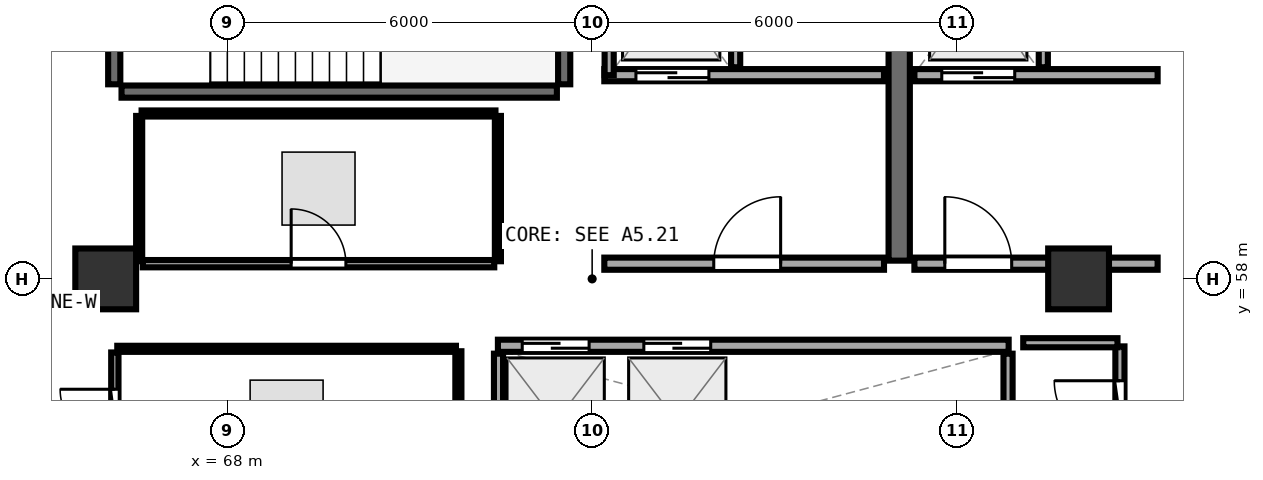
"""IFC4 building model, lengths in metres.
Left out: names, types, materials, properties, quantities, classifications, styles, units other than length and angle.
Written with IfcOpenShell. Run it as: python <this file> out.ifc"""

import sys

from ifc_helpers import new_model, si_unit, direction, frame, frame_2d, origin, origin_2d, place, context, subcontext, project, spatial, rectangle, extrude, element, fill, save


model = new_model("IFC4")
c1 = context("Model", 3, precision=1e-05, world=origin(), true_north=direction((0.0, 1.0)))
c2 = subcontext(c1, "Body", "Model", "MODEL_VIEW")
j1 = project(units=[si_unit("LENGTHUNIT", "METRE"), si_unit("PLANEANGLEUNIT", "RADIAN")], contexts=[c1])
p1 = place(None, origin())
s1 = spatial("IfcSite", under=j1, at=p1, CompositionType="ELEMENT")
p2 = place(p1, origin())
s2 = spatial("IfcBuilding", under=s1, at=p2, CompositionType="ELEMENT")
p3 = place(p2, frame((0.0, 0.0, 274.95)))
s3 = spatial("IfcBuildingStorey", under=s2, at=p3, CompositionType="ELEMENT", Elevation=274.95)
for number, where, z_axis, x_axis in (
    (1, (82.0, 58.0, 0.0), (0.0, 0.0, 1.0), (1.0, 0.0, 0.0)),
    (2, (66.0, 58.0, 0.0), (0.0, 0.0, 1.0), (1.0, 0.0, 0.0)),
):
    element("IfcColumn", number, at=place(p3, frame(where, z_axis=z_axis, x_axis=x_axis)), inside=s3, PredefinedType="PILASTER", context=c2, shape_type="SweptSolid", body=[
        extrude(rectangle(XDim=1.0, YDim=1.0, at=origin_2d()), origin(), (0.0, 0.0, 1.0), 3.75),
    ])
p4 = place(p3, frame((66.26, 61.08, 0.0), z_axis=(0.0, 0.0, 1.0), x_axis=(1.0, 0.0, 0.0)))
e3 = element("IfcWall", 3, at=p4, inside=s3, PredefinedType="SHEAR", context=c2, shape_type="SweptSolid", body=[
    extrude(rectangle(XDim=7.16, YDim=0.2, at=frame_2d((3.58, 0.0))), origin(), (0.0, 0.0, 1.0), 3.49),
])
p5 = place(p3, frame((73.54, 61.2, 0.0), z_axis=(0.0, 0.0, 1.0), x_axis=(0.0, 1.0, 0.0)))
e4 = element("IfcWall", 4, at=p5, inside=s3, PredefinedType="SHEAR", context=c2, shape_type="SweptSolid", body=[
    extrude(rectangle(XDim=3.07, YDim=0.2, at=frame_2d((1.535, 0.0))), origin(), (0.0, 0.0, 1.0), 3.49),
])
p6 = place(p3, frame((66.14, 64.27, 0.0), z_axis=(0.0, 0.0, 1.0), x_axis=(0.0, -1.0, 0.0)))
e5 = element("IfcWall", 5, at=p6, inside=s3, PredefinedType="SHEAR", context=c2, shape_type="SweptSolid", body=[
    extrude(rectangle(XDim=3.07, YDim=0.2, at=frame_2d((1.535, 0.0))), origin(), (0.0, 0.0, 1.0), 3.49),
])
p7 = place(p6, frame((1.01, 0.0, 0.0)))
e6 = element("IfcOpeningElement", 6, at=p7, cuts=e5, PredefinedType="OPENING", context=c2, shape_type="SweptSolid", body=[
    extrude(rectangle(XDim=1.05, YDim=2.1, at=frame_2d((0.525, 1.05))), frame((0.0, 0.11, 0.0), z_axis=(0.0, -1.0, 0.0), x_axis=(1.0, 0.0, 0.0)), (0.0, 0.0, 1.0), 0.22),
])
p8 = place(p3, frame((79.05, 58.3, 0.0), z_axis=(0.0, 0.0, 1.0), x_axis=(0.0, 1.0, 0.0)))
e7 = element("IfcWall", 7, at=p8, inside=s3, PredefinedType="SHEAR", context=c2, shape_type="SweptSolid", body=[
    extrude(rectangle(XDim=6.3, YDim=0.35, at=frame_2d((3.15, 0.0))), origin(), (0.0, 0.0, 1.0), 3.49),
])
p9 = place(p3, frame((74.2, 61.35, 0.0), z_axis=(0.0, 0.0, 1.0), x_axis=(1.0, 0.0, 0.0)))
e8 = element("IfcWall", 8, at=p9, inside=s3, PredefinedType="SOLIDWALL", context=c2, shape_type="SweptSolid", body=[
    extrude(rectangle(XDim=4.6, YDim=0.2, at=frame_2d((2.3, 0.0))), origin(), (0.0, 0.0, 1.0), 3.48),
])
p10 = place(p9, frame((0.52, 0.0, 0.0)))
e9 = element("IfcOpeningElement", 9, at=p10, cuts=e8, PredefinedType="OPENING", context=c2, shape_type="SweptSolid", body=[
    extrude(rectangle(XDim=1.2, YDim=2.15, at=frame_2d((0.6, 1.075))), frame((0.0, 0.11, 0.0), z_axis=(0.0, -1.0, 0.0), x_axis=(1.0, 0.0, 0.0)), (0.0, 0.0, 1.0), 0.22),
])
p11 = place(p3, frame((74.28, 61.35, 0.0), z_axis=(0.0, 0.0, 1.0), x_axis=(0.0, 1.0, 0.0)))
e10 = element("IfcWall", 10, at=p11, inside=s3, PredefinedType="PARTITIONING", context=c2, shape_type="SweptSolid", body=[
    extrude(rectangle(XDim=2.97, YDim=0.15, at=frame_2d((1.485, 0.0))), origin(), (0.0, 0.0, 1.0), 3.48),
])
p12 = place(p3, frame((76.36, 61.48, 0.0), z_axis=(0.0, 0.0, 1.0), x_axis=(0.0, 1.0, 0.0)))
e11 = element("IfcWall", 11, at=p12, inside=s3, PredefinedType="PARTITIONING", context=c2, shape_type="SweptSolid", body=[
    extrude(rectangle(XDim=2.84, YDim=0.15, at=frame_2d((1.42, 0.0))), origin(), (0.0, 0.0, 1.0), 3.48),
])
p13 = place(p3, frame((79.3, 61.35, 0.0), z_axis=(0.0, 0.0, 1.0), x_axis=(1.0, 0.0, 0.0)))
e12 = element("IfcWall", 12, at=p13, inside=s3, PredefinedType="SOLIDWALL", context=c2, shape_type="SweptSolid", body=[
    extrude(rectangle(XDim=4.0, YDim=0.2, at=frame_2d((2.0, 0.0))), origin(), (0.0, 0.0, 1.0), 2.775),
])
p14 = place(p13, frame((0.45, 0.0, 0.0)))
e13 = element("IfcOpeningElement", 13, at=p14, cuts=e12, PredefinedType="OPENING", context=c2, shape_type="SweptSolid", body=[
    extrude(rectangle(XDim=1.2, YDim=2.15, at=frame_2d((0.6, 1.075))), frame((0.0, 0.11, 0.0), z_axis=(0.0, -1.0, 0.0), x_axis=(1.0, 0.0, 0.0)), (0.0, 0.0, 1.0), 0.22),
])
p15 = place(p3, frame((81.42, 61.48, 0.0), z_axis=(0.0, 0.0, 1.0), x_axis=(0.0, 1.0, 0.0)))
e14 = element("IfcWall", 14, at=p15, inside=s3, PredefinedType="PARTITIONING", context=c2, shape_type="SweptSolid", body=[
    extrude(rectangle(XDim=2.84, YDim=0.15, at=frame_2d((1.42, 0.0))), origin(), (0.0, 0.0, 1.0), 3.48),
])
p16 = place(p3, frame((74.2, 58.25, 0.0), z_axis=(0.0, 0.0, 1.0), x_axis=(1.0, 0.0, 0.0)))
e15 = element("IfcWall", 15, at=p16, inside=s3, PredefinedType="SOLIDWALL", context=c2, shape_type="SweptSolid", body=[
    extrude(rectangle(XDim=4.6, YDim=0.2, at=frame_2d((2.3, 0.0))), origin(), (0.0, 0.0, 1.0), 3.48),
])
p17 = place(p16, frame((1.8, 0.0, 0.0)))
e16 = element("IfcOpeningElement", 16, at=p17, cuts=e15, PredefinedType="OPENING", context=c2, shape_type="SweptSolid", body=[
    extrude(rectangle(XDim=1.1, YDim=2.1, at=frame_2d((0.55, 1.05))), frame((0.0, 0.11, 0.0), z_axis=(0.0, -1.0, 0.0), x_axis=(1.0, 0.0, 0.0)), (0.0, 0.0, 1.0), 0.22),
])
p18 = place(p3, frame((79.3, 58.25, 0.0), z_axis=(0.0, 0.0, 1.0), x_axis=(1.0, 0.0, 0.0)))
e17 = element("IfcWall", 17, at=p18, inside=s3, PredefinedType="SOLIDWALL", context=c2, shape_type="SweptSolid", body=[
    extrude(rectangle(XDim=4.0, YDim=0.2, at=frame_2d((2.0, 0.0))), origin(), (0.0, 0.0, 1.0), 2.775),
])
p19 = place(p18, frame((0.5, 0.0, 0.0)))
e18 = element("IfcOpeningElement", 18, at=p19, cuts=e17, PredefinedType="OPENING", context=c2, shape_type="SweptSolid", body=[
    extrude(rectangle(XDim=1.1, YDim=2.1, at=frame_2d((0.55, 1.05))), frame((0.0, 0.11, 0.0), z_axis=(0.0, -1.0, 0.0), x_axis=(1.0, 0.0, 0.0)), (0.0, 0.0, 1.0), 0.22),
])
p20 = place(p3, frame((72.45, 56.9, 0.0), z_axis=(0.0, 0.0, 1.0), x_axis=(1.0, 0.0, 0.0)))
e19 = element("IfcWall", 19, at=p20, inside=s3, PredefinedType="SOLIDWALL", context=c2, shape_type="SweptSolid", body=[
    extrude(rectangle(XDim=8.4, YDim=0.2, at=frame_2d((4.2, 0.0))), origin(), (0.0, 0.0, 1.0), 3.48),
])
p21 = place(p20, frame((0.4, 0.0, 0.0)))
e20 = element("IfcOpeningElement", 20, at=p21, cuts=e19, PredefinedType="OPENING", context=c2, shape_type="SweptSolid", body=[
    extrude(rectangle(XDim=1.1, YDim=2.1, at=frame_2d((0.55, 1.05))), frame((0.0, 0.11, 0.0), z_axis=(0.0, -1.0, 0.0), x_axis=(1.0, 0.0, 0.0)), (0.0, 0.0, 1.0), 0.22),
])
p22 = place(p20, frame((2.4, 0.0, 0.0)))
e21 = element("IfcOpeningElement", 21, at=p22, cuts=e19, PredefinedType="OPENING", context=c2, shape_type="SweptSolid", body=[
    extrude(rectangle(XDim=1.1, YDim=2.1, at=frame_2d((0.55, 1.05))), frame((0.0, 0.11, 0.0), z_axis=(0.0, -1.0, 0.0), x_axis=(1.0, 0.0, 0.0)), (0.0, 0.0, 1.0), 0.22),
])
for number, where, z_axis, x_axis in (
    (22, (72.46, 54.48, 0.0), (0.0, 0.0, 1.0), (0.0, 1.0, 0.0)),
    (23, (80.84, 54.48, 0.0), (0.0, 0.0, 1.0), (0.0, 1.0, 0.0)),
):
    element("IfcWall", number, at=place(p3, frame(where, z_axis=z_axis, x_axis=x_axis)), inside=s3, PredefinedType="PARTITIONING", context=c2, shape_type="SweptSolid", body=[
        extrude(rectangle(XDim=2.29, YDim=0.15, at=frame_2d((1.145, 0.0))), origin(), (0.0, 0.0, 1.0), 3.48),
    ])
p23 = place(p3, frame((82.68, 54.68, 0.0), z_axis=(0.0, 0.0, 1.0), x_axis=(0.0, 1.0, 0.0)))
e24 = element("IfcWall", 24, at=p23, inside=s3, PredefinedType="PARTITIONING", context=c2, shape_type="SweptSolid", body=[
    extrude(rectangle(XDim=2.21, YDim=0.15, at=frame_2d((1.105, 0.0))), origin(), (0.0, 0.0, 1.0), 3.48),
])
p24 = place(p23, frame((0.565, 0.0, 0.0)))
e25 = element("IfcOpeningElement", 25, at=p24, cuts=e24, PredefinedType="OPENING", context=c2, shape_type="SweptSolid", body=[
    extrude(rectangle(XDim=1.08, YDim=2.1, at=frame_2d((0.54, 1.05))), frame((0.0, 0.085, 0.0), z_axis=(0.0, -1.0, 0.0), x_axis=(1.0, 0.0, 0.0)), (0.0, 0.0, 1.0), 0.17),
])
p25 = place(p3, frame((66.61, 58.25, 0.0), z_axis=(0.0, 0.0, 1.0), x_axis=(1.0, 0.0, 0.0)))
e26 = element("IfcWall", 26, at=p25, inside=s3, PredefinedType="PARTITIONING", context=c2, shape_type="SweptSolid", body=[
    extrude(rectangle(XDim=5.78, YDim=0.12, at=frame_2d((2.89, 0.0))), origin(), (0.0, 0.0, 1.0), 3.48),
])
p26 = place(p25, frame((2.44, 0.0, 0.0)))
e27 = element("IfcOpeningElement", 27, at=p26, cuts=e26, PredefinedType="OPENING", context=c2, shape_type="SweptSolid", body=[
    extrude(rectangle(XDim=0.9, YDim=2.08, at=frame_2d((0.45, 1.04))), frame((0.0, 0.07, 0.0), z_axis=(0.0, -1.0, 0.0), x_axis=(1.0, 0.0, 0.0)), (0.0, 0.0, 1.0), 0.14),
])
p27 = place(p3, frame((66.15, 54.68, 0.0), z_axis=(0.0, 0.0, 1.0), x_axis=(0.0, 1.0, 0.0)))
e28 = element("IfcWall", 28, at=p27, inside=s3, PredefinedType="PARTITIONING", context=c2, shape_type="SweptSolid", body=[
    extrude(rectangle(XDim=2.11, YDim=0.12, at=frame_2d((1.055, 0.0))), origin(), (0.0, 0.0, 1.0), 2.775),
])
p28 = place(p27, frame((0.605, 0.0, 0.0)))
e29 = element("IfcOpeningElement", 29, at=p28, cuts=e28, PredefinedType="OPENING", context=c2, shape_type="SweptSolid", body=[
    extrude(rectangle(XDim=0.9, YDim=2.08, at=frame_2d((0.45, 1.04))), frame((0.0, 0.07, 0.0), z_axis=(0.0, -1.0, 0.0), x_axis=(1.0, 0.0, 0.0)), (0.0, 0.0, 1.0), 0.14),
])
p29 = place(p3, frame((82.64, 56.95, 0.0), z_axis=(0.0, 0.0, 1.0), x_axis=(-1.0, 0.0, 0.0)))
e30 = element("IfcWall", 30, at=p29, inside=s3, PredefinedType="PARTITIONING", context=c2, shape_type="SweptSolid", body=[
    extrude(rectangle(XDim=1.55, YDim=0.15, at=frame_2d((0.775, 0.0))), origin(), (0.0, 0.0, 1.0), 2.775),
])
p30 = place(p3, frame((72.45, 58.29, 0.0), z_axis=(0.0, 0.0, 1.0), x_axis=(0.0, 1.0, 0.0)))
e31 = element("IfcWall", 31, at=p30, inside=s3, PredefinedType="PARTITIONING", context=c2, shape_type="SweptSolid", body=[
    extrude(rectangle(XDim=2.39, YDim=0.1, at=frame_2d((1.195, 0.0))), origin(), (0.0, 0.0, 1.0), 3.48),
])
p31 = place(p3, frame((72.41, 60.72, 0.0), z_axis=(0.0, 0.0, 1.0), x_axis=(-1.0, 0.0, 0.0)))
e32 = element("IfcWall", 32, at=p31, inside=s3, PredefinedType="PARTITIONING", context=c2, shape_type="SweptSolid", body=[
    extrude(rectangle(XDim=5.82, YDim=0.1, at=frame_2d((2.91, 0.0))), origin(), (0.0, 0.0, 1.0), 3.48),
])
p32 = place(p3, frame((66.55, 60.68, 0.0), z_axis=(0.0, 0.0, 1.0), x_axis=(0.0, -1.0, 0.0)))
e33 = element("IfcWall", 33, at=p32, inside=s3, PredefinedType="PARTITIONING", context=c2, shape_type="SweptSolid", body=[
    extrude(rectangle(XDim=2.39, YDim=0.1, at=frame_2d((1.195, 0.0))), origin(), (0.0, 0.0, 1.0), 3.48),
])
p33 = place(p3, frame((71.8, 54.66, 0.0), z_axis=(0.0, 0.0, 1.0), x_axis=(0.0, 1.0, 0.0)))
e34 = element("IfcWall", 34, at=p33, inside=s3, PredefinedType="PARTITIONING", context=c2, shape_type="SweptSolid", body=[
    extrude(rectangle(XDim=2.15, YDim=0.1, at=frame_2d((1.075, 0.0))), origin(), (0.0, 0.0, 1.0), 3.48),
])
p34 = place(p3, frame((71.76, 56.85, 0.0), z_axis=(0.0, 0.0, 1.0), x_axis=(-1.0, 0.0, 0.0)))
e35 = element("IfcWall", 35, at=p34, inside=s3, PredefinedType="PARTITIONING", context=c2, shape_type="SweptSolid", body=[
    extrude(rectangle(XDim=5.57, YDim=0.1, at=frame_2d((2.785, 0.0))), origin(), (0.0, 0.0, 1.0), 2.775),
])
p35 = place(p10, origin())
e36 = element("IfcDoor", 36, at=p35, inside=s3, OperationType="DOUBLE_DOOR_SLIDING", PredefinedType="DOOR", context=c2, shape_type="SweptSolid", body=[
    extrude(rectangle(XDim=1.2, YDim=2.15, at=frame_2d((0.6, 1.075))), frame((0.0, 0.025, 0.0), z_axis=(0.0, -1.0, 0.0), x_axis=(1.0, 0.0, 0.0)), (0.0, 0.0, 1.0), 0.05),
])
fill(e9, e36)
p36 = place(p14, origin())
e37 = element("IfcDoor", 37, at=p36, inside=s3, OperationType="DOUBLE_DOOR_SLIDING", PredefinedType="DOOR", context=c2, shape_type="SweptSolid", body=[
    extrude(rectangle(XDim=1.2, YDim=2.15, at=frame_2d((0.6, 1.075))), frame((0.0, 0.025, 0.0), z_axis=(0.0, -1.0, 0.0), x_axis=(1.0, 0.0, 0.0)), (0.0, 0.0, 1.0), 0.05),
])
fill(e13, e37)
p37 = place(p17, frame((1.1, 0.0, 0.0), z_axis=(0.0, 0.0, 1.0), x_axis=(-1.0, 0.0, 0.0)))
e38 = element("IfcDoor", 38, at=p37, inside=s3, OperationType="SINGLE_SWING_LEFT", PredefinedType="DOOR", context=c2, shape_type="SweptSolid", body=[
    extrude(rectangle(XDim=1.1, YDim=2.1, at=frame_2d((0.55, 1.05))), frame((0.0, 0.025, 0.0), z_axis=(0.0, -1.0, 0.0), x_axis=(1.0, 0.0, 0.0)), (0.0, 0.0, 1.0), 0.05),
])
fill(e16, e38)
p38 = place(p19, frame((1.1, 0.0, 0.0), z_axis=(0.0, 0.0, 1.0), x_axis=(-1.0, 0.0, 0.0)))
e39 = element("IfcDoor", 39, at=p38, inside=s3, OperationType="SINGLE_SWING_RIGHT", PredefinedType="DOOR", context=c2, shape_type="SweptSolid", body=[
    extrude(rectangle(XDim=1.1, YDim=2.1, at=frame_2d((0.55, 1.05))), frame((0.0, 0.025, 0.0), z_axis=(0.0, -1.0, 0.0), x_axis=(1.0, 0.0, 0.0)), (0.0, 0.0, 1.0), 0.05),
])
fill(e18, e39)
p39 = place(p21, origin())
e40 = element("IfcDoor", 40, at=p39, inside=s3, OperationType="DOUBLE_DOOR_SLIDING", PredefinedType="DOOR", context=c2, shape_type="SweptSolid", body=[
    extrude(rectangle(XDim=1.1, YDim=2.1, at=frame_2d((0.55, 1.05))), frame((0.0, 0.025, 0.0), z_axis=(0.0, -1.0, 0.0), x_axis=(1.0, 0.0, 0.0)), (0.0, 0.0, 1.0), 0.05),
])
fill(e20, e40)
p40 = place(p22, origin())
e41 = element("IfcDoor", 41, at=p40, inside=s3, OperationType="DOUBLE_DOOR_SLIDING", PredefinedType="DOOR", context=c2, shape_type="SweptSolid", body=[
    extrude(rectangle(XDim=1.1, YDim=2.1, at=frame_2d((0.55, 1.05))), frame((0.0, 0.025, 0.0), z_axis=(0.0, -1.0, 0.0), x_axis=(1.0, 0.0, 0.0)), (0.0, 0.0, 1.0), 0.05),
])
fill(e21, e41)
p41 = place(p24, origin())
e42 = element("IfcDoor", 42, at=p41, inside=s3, OperationType="SINGLE_SWING_RIGHT", PredefinedType="DOOR", context=c2, shape_type="SweptSolid", body=[
    extrude(rectangle(XDim=1.08, YDim=2.1, at=frame_2d((0.54, 1.05))), frame((0.0, 0.025, 0.0), z_axis=(0.0, -1.0, 0.0), x_axis=(1.0, 0.0, 0.0)), (0.0, 0.0, 1.0), 0.05),
])
fill(e25, e42)
p42 = place(p26, origin())
e43 = element("IfcDoor", 43, at=p42, inside=s3, OperationType="SINGLE_SWING_LEFT", PredefinedType="DOOR", context=c2, shape_type="SweptSolid", body=[
    extrude(rectangle(XDim=0.9, YDim=2.08, at=frame_2d((0.45, 1.04))), frame((0.0, 0.025, 0.0), z_axis=(0.0, -1.0, 0.0), x_axis=(1.0, 0.0, 0.0)), (0.0, 0.0, 1.0), 0.05),
])
fill(e27, e43)
p43 = place(p28, origin())
e44 = element("IfcDoor", 44, at=p43, inside=s3, OperationType="SINGLE_SWING_RIGHT", PredefinedType="DOOR", context=c2, shape_type="SweptSolid", body=[
    extrude(rectangle(XDim=0.9, YDim=2.08, at=frame_2d((0.45, 1.04))), frame((0.0, 0.025, 0.0), z_axis=(0.0, -1.0, 0.0), x_axis=(1.0, 0.0, 0.0)), (0.0, 0.0, 1.0), 0.05),
])
fill(e29, e44)
save(model, sys.argv[1])
